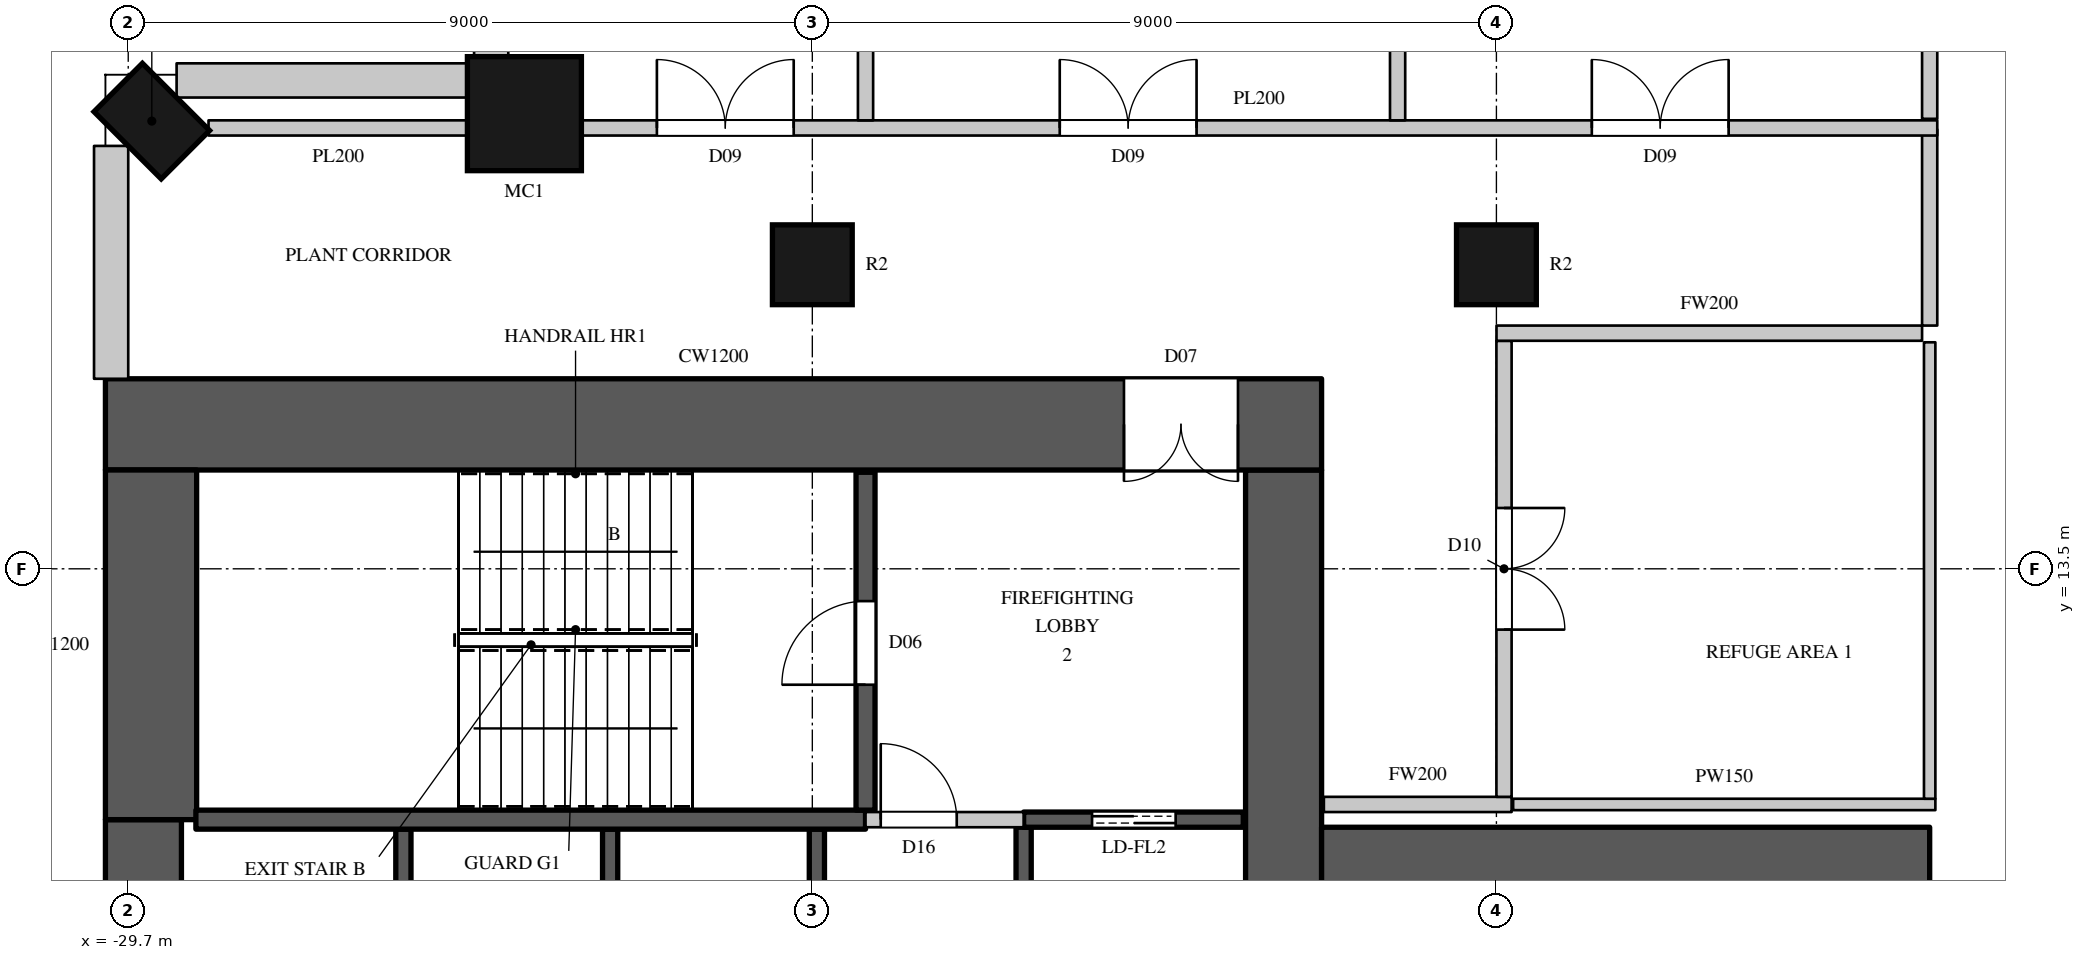
"""IFC4 building model, lengths in metres.
Left out: names, types, materials, properties, quantities, classifications, styles, units other than length and angle.
Written with IfcOpenShell. Run it as: python <this file> out.ifc"""

import sys

from ifc_helpers import new_model, si_unit, direction, frame, frame_2d, origin, origin_2d, place, context, subcontext, project, spatial, rectangle, circle, extrude, element, fill, save


model = new_model("IFC4")
c1 = context("Model", 3, precision=1e-05, world=origin(), true_north=direction((0.0, 1.0)))
c2 = subcontext(c1, "Body", "Model", "MODEL_VIEW")
j1 = project(units=[si_unit("LENGTHUNIT", "METRE"), si_unit("PLANEANGLEUNIT", "RADIAN")], contexts=[c1])
p1 = place(None, origin())
s1 = spatial("IfcSite", under=j1, at=p1, CompositionType="ELEMENT")
p2 = place(p1, origin())
s2 = spatial("IfcBuilding", under=s1, at=p2, CompositionType="ELEMENT")
p3 = place(p2, frame((0.0, 0.0, 152.5)))
s3 = spatial("IfcBuildingStorey", under=s2, at=p3, CompositionType="ELEMENT", Elevation=152.5)
p4 = place(p3, frame((-29.39, 19.39, 0.0), z_axis=(0.0, 0.0, 1.0), x_axis=(-0.707106781187, -0.707106781187, 0.0)))
e1 = element("IfcColumn", 1, at=p4, inside=s3, PredefinedType="COLUMN", context=c2, shape_type="SweptSolid", body=[
    extrude(rectangle(XDim=0.9, YDim=1.25, at=origin_2d()), origin(), (0.0, 0.0, 1.0), 8.0),
])
p5 = place(p3, frame((-24.488, 19.488, 0.0), z_axis=(0.0, 0.0, 1.0), x_axis=(1.0, 0.0, 0.0)))
e2 = element("IfcColumn", 2, at=p5, inside=s3, PredefinedType="COLUMN", context=c2, shape_type="SweptSolid", body=[
    extrude(circle(Radius=0.75, at=origin_2d()), origin(), (0.0, 0.0, 1.0), 8.0),
])
for number, where, z_axis, x_axis in (
    (3, (-20.7, 17.5, 0.0), (0.0, 0.0, 1.0), (1.0, 0.0, 0.0)),
    (4, (-11.7, 17.5, 0.0), (0.0, 0.0, 1.0), (1.0, 0.0, 0.0)),
):
    element("IfcColumn", number, at=place(p3, frame(where, z_axis=z_axis, x_axis=x_axis)), inside=s3, PredefinedType="COLUMN", context=c2, shape_type="SweptSolid", body=[
        extrude(circle(Radius=0.525, at=origin_2d()), origin(), (0.0, 0.0, 1.0), 8.0),
    ])
p6 = place(p3, frame((-14.0, 9.6, 0.0), z_axis=(0.0, 0.0, 1.0), x_axis=(1.0, 0.0, 0.0)))
e5 = element("IfcWall", 5, at=p6, inside=s3, PredefinedType="SOLIDWALL", context=c2, shape_type="SweptSolid", body=[
    extrude(rectangle(XDim=8.0, YDim=1.0, at=frame_2d((4.0, 0.0))), origin(), (0.0, 0.0, 1.0), 7.7),
])
p7 = place(p3, frame((-29.925, 19.064, 0.0), z_axis=(0.0, 0.0, 1.0), x_axis=(0.0, -1.0, 0.0)))
e6 = element("IfcWall", 6, at=p7, inside=s3, PredefinedType="SOLIDWALL", context=c2, shape_type="SweptSolid", body=[
    extrude(rectangle(XDim=3.064, YDim=0.45, at=frame_2d((1.532, 0.0))), origin(), (0.0, 0.0, 1.0), 6.4),
])
p8 = place(p3, frame((-24.925, 22.05, 0.0), z_axis=(0.0, 0.0, 1.0), x_axis=(0.0, -1.0, 0.0)))
e7 = element("IfcWall", 7, at=p8, inside=s3, PredefinedType="SOLIDWALL", context=c2, shape_type="SweptSolid", body=[
    extrude(rectangle(XDim=1.843, YDim=0.45, at=frame_2d((0.921, 0.0))), origin(), (0.0, 0.0, 1.0), 7.7),
])
p9 = place(p3, frame((-25.207, 19.925, 0.0), z_axis=(0.0, 0.0, 1.0), x_axis=(-1.0, 0.0, 0.0)))
e8 = element("IfcWall", 8, at=p9, inside=s3, PredefinedType="SOLIDWALL", context=c2, shape_type="SweptSolid", body=[
    extrude(rectangle(XDim=3.857, YDim=0.45, at=frame_2d((1.928, 0.0))), origin(), (0.0, 0.0, 1.0), 7.7),
])
p10 = place(p3, frame((-30.0, 15.4, 0.0), z_axis=(0.0, 0.0, 1.0), x_axis=(1.0, 0.0, 0.0)))
e9 = element("IfcWall", 9, at=p10, inside=s3, PredefinedType="SHEAR", context=c2, shape_type="SweptSolid", body=[
    extrude(rectangle(XDim=16.0, YDim=1.2, at=frame_2d((8.0, 0.0))), origin(), (0.0, 0.0, 1.0), 8.0),
])
p11 = place(p10, frame((13.4, 0.0, 0.0)))
e10 = element("IfcOpeningElement", 10, at=p11, cuts=e9, PredefinedType="OPENING", context=c2, shape_type="SweptSolid", body=[
    extrude(rectangle(XDim=1.5, YDim=2.4, at=frame_2d((0.75, 1.2))), frame((0.0, 0.61, 0.0), z_axis=(0.0, -1.0, 0.0), x_axis=(1.0, 0.0, 0.0)), (0.0, 0.0, 1.0), 1.22),
])
p12 = place(p3, frame((-14.5, -14.8, 0.0), z_axis=(0.0, 0.0, 1.0), x_axis=(0.0, 1.0, 0.0)))
e11 = element("IfcWall", 11, at=p12, inside=s3, PredefinedType="SHEAR", context=c2, shape_type="SweptSolid", body=[
    extrude(rectangle(XDim=29.6, YDim=1.0, at=frame_2d((14.8, 0.0))), origin(), (0.0, 0.0, 1.0), 8.0),
])
p13 = place(p12, frame((8.45, 0.0, 0.0)))
e12 = element("IfcOpeningElement", 12, at=p13, cuts=e11, PredefinedType="OPENING", context=c2, shape_type="SweptSolid", body=[
    extrude(rectangle(XDim=1.5, YDim=2.4, at=frame_2d((0.75, 1.2))), frame((0.0, 0.51, 0.0), z_axis=(0.0, -1.0, 0.0), x_axis=(1.0, 0.0, 0.0)), (0.0, 0.0, 1.0), 1.02),
])
p14 = place(p12, frame((19.65, 0.0, 0.0)))
e13 = element("IfcOpeningElement", 13, at=p14, cuts=e11, PredefinedType="OPENING", context=c2, shape_type="SweptSolid", body=[
    extrude(rectangle(XDim=1.5, YDim=2.4, at=frame_2d((0.75, 1.2))), frame((0.0, 0.51, 0.0), z_axis=(0.0, -1.0, 0.0), x_axis=(1.0, 0.0, 0.0)), (0.0, 0.0, 1.0), 1.02),
])
p15 = place(p12, frame((14.5, 0.0, 0.0)))
e14 = element("IfcOpeningElement", 14, at=p15, cuts=e11, PredefinedType="OPENING", context=c2, shape_type="SweptSolid", body=[
    extrude(rectangle(XDim=0.6, YDim=2.0, at=frame_2d((0.3, 1.0))), frame((0.0, 0.51, 0.0), z_axis=(0.0, -1.0, 0.0), x_axis=(1.0, 0.0, 0.0)), (0.0, 0.0, 1.0), 1.02),
])
p16 = place(p3, frame((-29.5, -10.2, 0.0), z_axis=(0.0, 0.0, 1.0), x_axis=(0.0, 1.0, 0.0)))
e15 = element("IfcWall", 15, at=p16, inside=s3, PredefinedType="SHEAR", context=c2, shape_type="SweptSolid", body=[
    extrude(rectangle(XDim=20.4, YDim=1.0, at=frame_2d((10.2, 0.0))), origin(), (0.0, 0.0, 1.0), 8.0),
])
p17 = place(p3, frame((-29.4, 10.2, 0.0), z_axis=(0.0, 0.0, 1.0), x_axis=(0.0, 1.0, 0.0)))
e16 = element("IfcWall", 16, at=p17, inside=s3, PredefinedType="SHEAR", context=c2, shape_type="SweptSolid", body=[
    extrude(rectangle(XDim=4.6, YDim=1.2, at=frame_2d((2.3, 0.0))), origin(), (0.0, 0.0, 1.0), 8.0),
])
p18 = place(p3, frame((-20.0, 10.2, 0.0), z_axis=(0.0, 0.0, 1.0), x_axis=(1.0, 0.0, 0.0)))
e17 = element("IfcWall", 17, at=p18, inside=s3, PredefinedType="PARTITIONING", context=c2, shape_type="SweptSolid", body=[
    extrude(rectangle(XDim=2.08, YDim=0.2, at=frame_2d((1.04, 0.0))), origin(), (0.0, 0.0, 1.0), 7.7),
])
p19 = place(p18, frame((0.2, 0.0, 0.0)))
e18 = element("IfcOpeningElement", 18, at=p19, cuts=e17, PredefinedType="OPENING", context=c2, shape_type="SweptSolid", body=[
    extrude(rectangle(XDim=1.0, YDim=2.2, at=frame_2d((0.5, 1.1))), frame((0.0, 0.11, 0.0), z_axis=(0.0, -1.0, 0.0), x_axis=(1.0, 0.0, 0.0)), (0.0, 0.0, 1.0), 0.22),
])
p20 = place(p3, frame((-13.97, 10.4, 0.0), z_axis=(0.0, 0.0, 1.0), x_axis=(1.0, 0.0, 0.0)))
e19 = element("IfcWall", 19, at=p20, inside=s3, PredefinedType="PARTITIONING", context=c2, shape_type="SweptSolid", body=[
    extrude(rectangle(XDim=2.47, YDim=0.2, at=frame_2d((1.235, 0.0))), origin(), (0.0, 0.0, 1.0), 7.7),
])
p21 = place(p3, frame((-11.6, 10.5, 0.0), z_axis=(0.0, 0.0, 1.0), x_axis=(0.0, 1.0, 0.0)))
e20 = element("IfcWall", 20, at=p21, inside=s3, PredefinedType="PARTITIONING", context=c2, shape_type="SweptSolid", body=[
    extrude(rectangle(XDim=5.999, YDim=0.2, at=frame_2d((3.0, 0.0))), origin(), (0.0, 0.0, 1.0), 7.15),
])
p22 = place(p21, frame((2.2, 0.0, 0.0)))
e21 = element("IfcOpeningElement", 21, at=p22, cuts=e20, PredefinedType="OPENING", context=c2, shape_type="SweptSolid", body=[
    extrude(rectangle(XDim=1.6, YDim=2.4, at=frame_2d((0.8, 1.2))), frame((0.0, 0.11, 0.0), z_axis=(0.0, -1.0, 0.0), x_axis=(1.0, 0.0, 0.0)), (0.0, 0.0, 1.0), 0.22),
])
p23 = place(p3, frame((-11.699, 16.6, 0.0), z_axis=(0.0, 0.0, 1.0), x_axis=(1.0, 0.0, 0.0)))
e22 = element("IfcWall", 22, at=p23, inside=s3, PredefinedType="PARTITIONING", context=c2, shape_type="SweptSolid", body=[
    extrude(rectangle(XDim=5.599, YDim=0.2, at=frame_2d((2.799, 0.0))), origin(), (0.0, 0.0, 1.0), 5.85),
])
p24 = place(p3, frame((-6.0, 16.7, 0.0), z_axis=(0.0, 0.0, 1.0), x_axis=(0.0, 1.0, 0.0)))
e23 = element("IfcWall", 23, at=p24, inside=s3, PredefinedType="PARTITIONING", context=c2, shape_type="SweptSolid", body=[
    extrude(rectangle(XDim=2.58, YDim=0.2, at=frame_2d((1.29, 0.0))), origin(), (0.0, 0.0, 1.0), 7.7),
])
p25 = place(p3, frame((-11.48, 10.4, 0.0), z_axis=(0.0, 0.0, 1.0), x_axis=(1.0, 0.0, 0.0)))
e24 = element("IfcWall", 24, at=p25, inside=s3, PredefinedType="PARTITIONING", context=c2, shape_type="SweptSolid", body=[
    extrude(rectangle(XDim=5.555, YDim=0.15, at=frame_2d((2.777, 0.0))), origin(), (0.0, 0.0, 1.0), 7.7),
])
p26 = place(p3, frame((-6.0, 10.475, 0.0), z_axis=(0.0, 0.0, 1.0), x_axis=(0.0, 1.0, 0.0)))
e25 = element("IfcWall", 25, at=p26, inside=s3, PredefinedType="PARTITIONING", context=c2, shape_type="SweptSolid", body=[
    extrude(rectangle(XDim=6.005, YDim=0.15, at=frame_2d((3.002, 0.0))), origin(), (0.0, 0.0, 1.0), 7.7),
])
p27 = place(p3, frame((-28.644, 19.3, 0.0), z_axis=(0.0, 0.0, 1.0), x_axis=(1.0, 0.0, 0.0)))
e26 = element("IfcWall", 26, at=p27, inside=s3, PredefinedType="PARTITIONING", context=c2, shape_type="SweptSolid", body=[
    extrude(rectangle(XDim=3.413, YDim=0.2, at=frame_2d((1.706, 0.0))), origin(), (0.0, 0.0, 1.0), 7.7),
])
p28 = place(p3, frame((-23.745, 19.3, 0.0), z_axis=(0.0, 0.0, 1.0), x_axis=(1.0, 0.0, 0.0)))
e27 = element("IfcWall", 27, at=p28, inside=s3, PredefinedType="PARTITIONING", context=c2, shape_type="SweptSolid", body=[
    extrude(rectangle(XDim=17.845, YDim=0.2, at=frame_2d((8.922, 0.0))), origin(), (0.0, 0.0, 1.0), 7.7),
])
p29 = place(p28, frame((1.0, 0.0, 0.0)))
e28 = element("IfcOpeningElement", 28, at=p29, cuts=e27, PredefinedType="OPENING", context=c2, shape_type="SweptSolid", body=[
    extrude(rectangle(XDim=1.8, YDim=2.4, at=frame_2d((0.9, 1.2))), frame((0.0, 0.11, 0.0), z_axis=(0.0, -1.0, 0.0), x_axis=(1.0, 0.0, 0.0)), (0.0, 0.0, 1.0), 0.22),
])
p30 = place(p28, frame((6.3, 0.0, 0.0)))
e29 = element("IfcOpeningElement", 29, at=p30, cuts=e27, PredefinedType="OPENING", context=c2, shape_type="SweptSolid", body=[
    extrude(rectangle(XDim=1.8, YDim=2.4, at=frame_2d((0.9, 1.2))), frame((0.0, 0.11, 0.0), z_axis=(0.0, -1.0, 0.0), x_axis=(1.0, 0.0, 0.0)), (0.0, 0.0, 1.0), 0.22),
])
p31 = place(p28, frame((13.3, 0.0, 0.0)))
e30 = element("IfcOpeningElement", 30, at=p31, cuts=e27, PredefinedType="OPENING", context=c2, shape_type="SweptSolid", body=[
    extrude(rectangle(XDim=1.8, YDim=2.4, at=frame_2d((0.9, 1.2))), frame((0.0, 0.11, 0.0), z_axis=(0.0, -1.0, 0.0), x_axis=(1.0, 0.0, 0.0)), (0.0, 0.0, 1.0), 0.22),
])
p32 = place(p3, frame((-20.0, 19.4, 0.0), z_axis=(0.0, 0.0, 1.0), x_axis=(0.0, 1.0, 0.0)))
e31 = element("IfcWall", 31, at=p32, inside=s3, PredefinedType="PARTITIONING", context=c2, shape_type="SweptSolid", body=[
    extrude(rectangle(XDim=6.3, YDim=0.2, at=frame_2d((3.15, 0.0))), origin(), (0.0, 0.0, 1.0), 6.4),
])
p33 = place(p3, frame((-13.0, 19.4, 0.0), z_axis=(0.0, 0.0, 1.0), x_axis=(0.0, 1.0, 0.0)))
e32 = element("IfcWall", 32, at=p33, inside=s3, PredefinedType="PARTITIONING", context=c2, shape_type="SweptSolid", body=[
    extrude(rectangle(XDim=6.3, YDim=0.2, at=frame_2d((3.15, 0.0))), origin(), (0.0, 0.0, 1.0), 7.7),
])
p34 = place(p3, frame((-6.0, 19.42, 0.0), z_axis=(0.0, 0.0, 1.0), x_axis=(0.0, 1.0, 0.0)))
e33 = element("IfcWall", 33, at=p34, inside=s3, PredefinedType="PARTITIONING", context=c2, shape_type="SweptSolid", body=[
    extrude(rectangle(XDim=6.28, YDim=0.2, at=frame_2d((3.14, 0.0))), origin(), (0.0, 0.0, 1.0), 7.7),
])
for number, where, z_axis, x_axis in (
    (34, (-26.08, 7.5, 0.0), (0.0, 0.0, 1.0), (0.0, 1.0, 0.0)),
    (35, (-23.36, 7.5, 0.0), (0.0, 0.0, 1.0), (0.0, 1.0, 0.0)),
):
    element("IfcWall", number, at=place(p3, frame(where, z_axis=z_axis, x_axis=x_axis)), inside=s3, PredefinedType="SHEAR", context=c2, shape_type="SweptSolid", body=[
        extrude(rectangle(XDim=2.575, YDim=0.2, at=frame_2d((1.288, 0.0))), origin(), (0.0, 0.0, 1.0), 8.0),
    ])
p35 = place(p3, frame((-20.64, 7.5, 0.0), z_axis=(0.0, 0.0, 1.0), x_axis=(0.0, 1.0, 0.0)))
e36 = element("IfcWall", 36, at=p35, inside=s3, PredefinedType="SHEAR", context=c2, shape_type="SweptSolid", body=[
    extrude(rectangle(XDim=2.575, YDim=0.2, at=frame_2d((1.288, 0.0))), origin(), (0.0, 0.0, 1.0), 7.7),
])
p36 = place(p3, frame((-17.92, 7.5, 0.0), z_axis=(0.0, 0.0, 1.0), x_axis=(0.0, 1.0, 0.0)))
e37 = element("IfcWall", 37, at=p36, inside=s3, PredefinedType="SHEAR", context=c2, shape_type="SweptSolid", body=[
    extrude(rectangle(XDim=2.6, YDim=0.2, at=frame_2d((1.3, 0.0))), origin(), (0.0, 0.0, 1.0), 7.7),
])
p37 = place(p3, frame((-17.92, 10.2, 0.0), z_axis=(0.0, 0.0, 1.0), x_axis=(1.0, 0.0, 0.0)))
e38 = element("IfcWall", 38, at=p37, inside=s3, PredefinedType="SHEAR", context=c2, shape_type="SweptSolid", body=[
    extrude(rectangle(XDim=2.89, YDim=0.2, at=frame_2d((1.445, 0.0))), origin(), (0.0, 0.0, 1.0), 7.7),
])
p38 = place(p37, frame((0.9, 0.0, 0.0)))
e39 = element("IfcOpeningElement", 39, at=p38, cuts=e38, PredefinedType="OPENING", context=c2, shape_type="SweptSolid", body=[
    extrude(rectangle(XDim=1.1, YDim=2.2, at=frame_2d((0.55, 1.1))), frame((0.0, 0.11, 0.0), z_axis=(0.0, -1.0, 0.0), x_axis=(1.0, 0.0, 0.0)), (0.0, 0.0, 1.0), 0.22),
])
p39 = place(p3, frame((-28.81, 10.2, 0.0), z_axis=(0.0, 0.0, 1.0), x_axis=(1.0, 0.0, 0.0)))
e40 = element("IfcWall", 40, at=p39, inside=s3, PredefinedType="SHEAR", context=c2, shape_type="SweptSolid", body=[
    extrude(rectangle(XDim=8.81, YDim=0.25, at=frame_2d((4.405, 0.0))), origin(), (0.0, 0.0, 1.0), 7.7),
])
p40 = place(p3, frame((-20.0, 10.325, 0.0), z_axis=(0.0, 0.0, 1.0), x_axis=(0.0, 1.0, 0.0)))
e41 = element("IfcWall", 41, at=p40, inside=s3, PredefinedType="SHEAR", context=c2, shape_type="SweptSolid", body=[
    extrude(rectangle(XDim=4.445, YDim=0.25, at=frame_2d((2.223, 0.0))), origin(), (0.0, 0.0, 1.0), 7.7),
])
p41 = place(p40, frame((1.65, 0.0, 0.0)))
e42 = element("IfcOpeningElement", 42, at=p41, cuts=e41, PredefinedType="OPENING", context=c2, shape_type="SweptSolid", body=[
    extrude(rectangle(XDim=1.1, YDim=2.2, at=frame_2d((0.55, 1.1))), frame((0.0, 0.135, 0.0), z_axis=(0.0, -1.0, 0.0), x_axis=(1.0, 0.0, 0.0)), (0.0, 0.0, 1.0), 0.27),
])
p42 = place(p41, origin())
e43 = element("IfcDoor", 43, at=p42, inside=s3, OperationType="SINGLE_SWING_LEFT", PredefinedType="DOOR", context=c2, shape_type="SweptSolid", body=[
    extrude(rectangle(XDim=1.1, YDim=2.2, at=frame_2d((0.55, 1.1))), frame((0.0, 0.025, 0.0), z_axis=(0.0, -1.0, 0.0), x_axis=(1.0, 0.0, 0.0)), (0.0, 0.0, 1.0), 0.05),
])
fill(e42, e43)
p43 = place(p19, origin())
e44 = element("IfcDoor", 44, at=p43, inside=s3, OperationType="SINGLE_SWING_LEFT", PredefinedType="DOOR", context=c2, shape_type="SweptSolid", body=[
    extrude(rectangle(XDim=1.0, YDim=2.2, at=frame_2d((0.5, 1.1))), frame((0.0, 0.025, 0.0), z_axis=(0.0, -1.0, 0.0), x_axis=(1.0, 0.0, 0.0)), (0.0, 0.0, 1.0), 0.05),
])
fill(e18, e44)
p44 = place(p38, origin())
e45 = element("IfcDoor", 45, at=p44, inside=s3, OperationType="DOUBLE_DOOR_SLIDING", PredefinedType="DOOR", context=c2, shape_type="SweptSolid", body=[
    extrude(rectangle(XDim=1.1, YDim=2.2, at=frame_2d((0.55, 1.1))), frame((0.0, 0.025, 0.0), z_axis=(0.0, -1.0, 0.0), x_axis=(1.0, 0.0, 0.0)), (0.0, 0.0, 1.0), 0.05),
])
fill(e39, e45)
p45 = place(p29, origin())
e46 = element("IfcDoor", 46, at=p45, inside=s3, OperationType="DOUBLE_DOOR_SINGLE_SWING", PredefinedType="DOOR", context=c2, shape_type="SweptSolid", body=[
    extrude(rectangle(XDim=1.8, YDim=2.4, at=frame_2d((0.9, 1.2))), frame((0.0, 0.025, 0.0), z_axis=(0.0, -1.0, 0.0), x_axis=(1.0, 0.0, 0.0)), (0.0, 0.0, 1.0), 0.05),
])
fill(e28, e46)
p46 = place(p30, origin())
e47 = element("IfcDoor", 47, at=p46, inside=s3, OperationType="DOUBLE_DOOR_SINGLE_SWING", PredefinedType="DOOR", context=c2, shape_type="SweptSolid", body=[
    extrude(rectangle(XDim=1.8, YDim=2.4, at=frame_2d((0.9, 1.2))), frame((0.0, 0.025, 0.0), z_axis=(0.0, -1.0, 0.0), x_axis=(1.0, 0.0, 0.0)), (0.0, 0.0, 1.0), 0.05),
])
fill(e29, e47)
p47 = place(p31, origin())
e48 = element("IfcDoor", 48, at=p47, inside=s3, OperationType="DOUBLE_DOOR_SINGLE_SWING", PredefinedType="DOOR", context=c2, shape_type="SweptSolid", body=[
    extrude(rectangle(XDim=1.8, YDim=2.4, at=frame_2d((0.9, 1.2))), frame((0.0, 0.025, 0.0), z_axis=(0.0, -1.0, 0.0), x_axis=(1.0, 0.0, 0.0)), (0.0, 0.0, 1.0), 0.05),
])
fill(e30, e48)
p48 = place(p22, origin())
e49 = element("IfcDoor", 49, at=p48, inside=s3, OperationType="DOUBLE_DOOR_SINGLE_SWING", PredefinedType="DOOR", context=c2, shape_type="SweptSolid", body=[
    extrude(rectangle(XDim=1.6, YDim=2.4, at=frame_2d((0.8, 1.2))), frame((0.0, 0.025, 0.0), z_axis=(0.0, -1.0, 0.0), x_axis=(1.0, 0.0, 0.0)), (0.0, 0.0, 1.0), 0.05),
])
fill(e21, e49)
p49 = place(p11, origin())
e50 = element("IfcDoor", 50, at=p49, inside=s3, OperationType="DOUBLE_DOOR_SINGLE_SWING", PredefinedType="DOOR", context=c2, shape_type="SweptSolid", body=[
    extrude(rectangle(XDim=1.5, YDim=2.4, at=frame_2d((0.75, 1.2))), frame((0.0, 0.025, 0.0), z_axis=(0.0, -1.0, 0.0), x_axis=(1.0, 0.0, 0.0)), (0.0, 0.0, 1.0), 0.05),
])
fill(e10, e50)
save(model, sys.argv[1])
